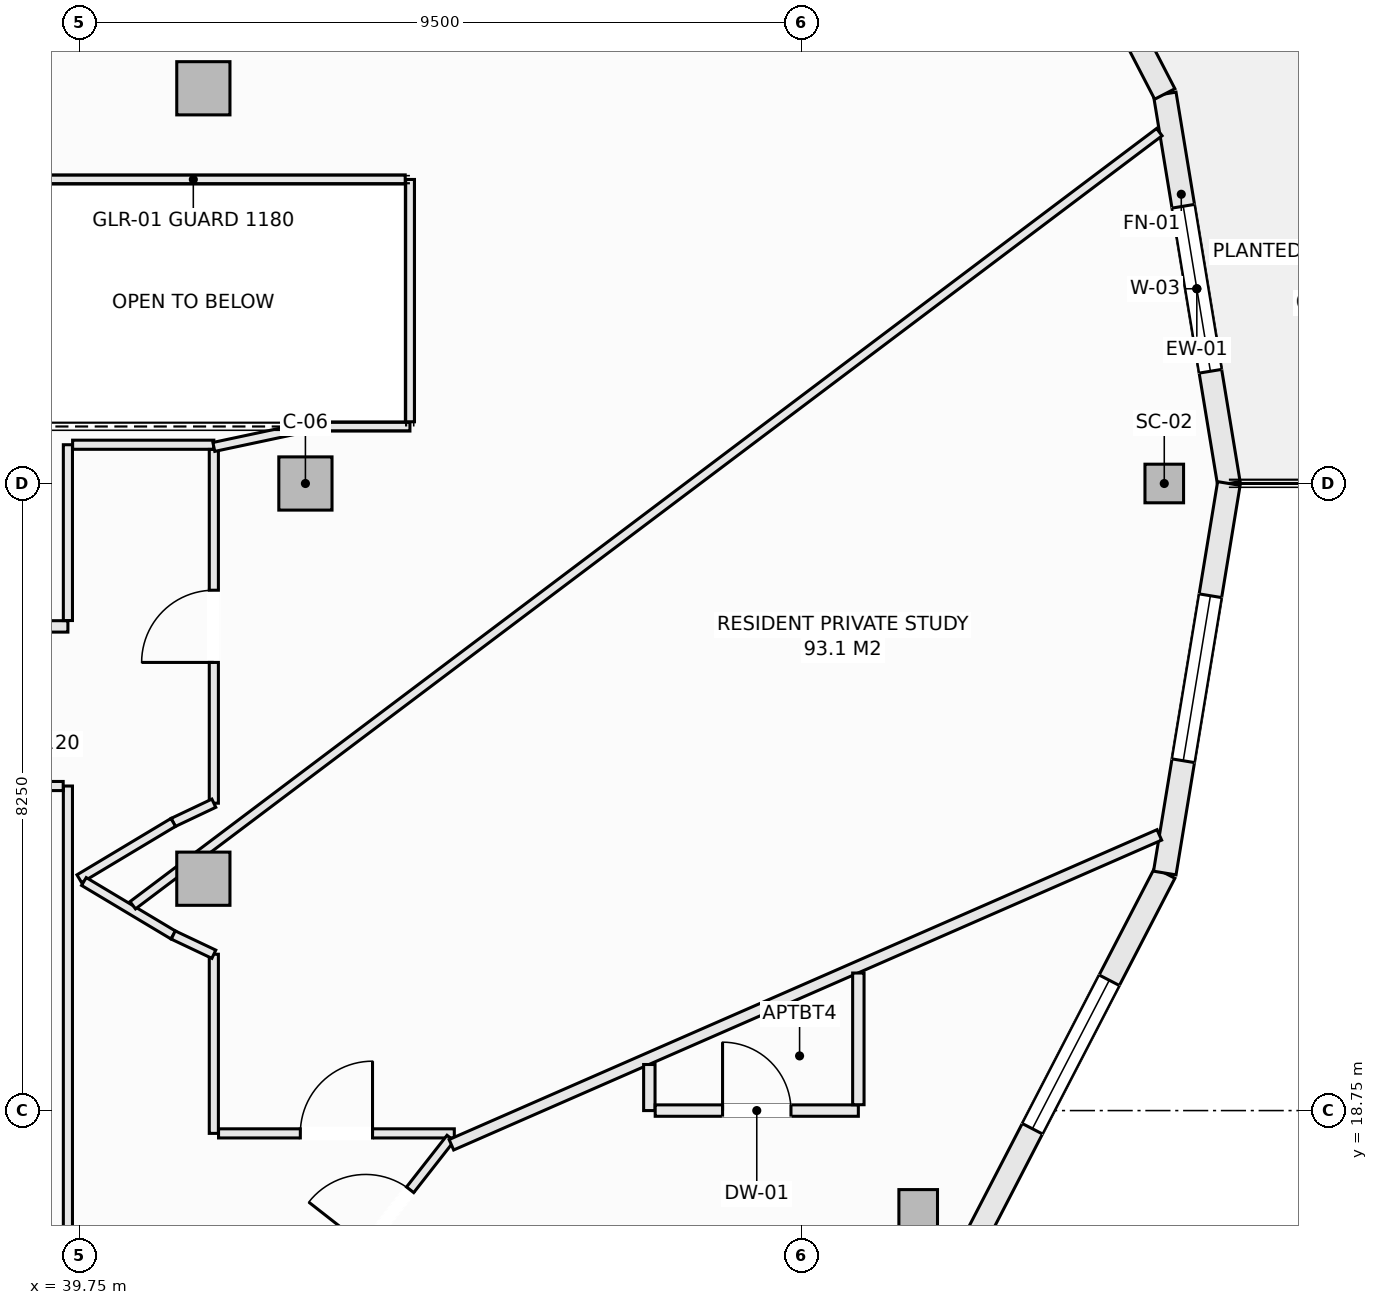
"""IFC4 building model, lengths in metres.
Left out: names, types, materials, properties, quantities, classifications, styles, units other than length and angle.
Written with IfcOpenShell. Run it as: python <this file> out.ifc"""

import sys

from ifc_helpers import new_model, si_unit, direction, frame, frame_2d, origin, origin_2d, place, context, subcontext, project, spatial, rectangle, hollow_rectangle, extrude, element, fill, save


model = new_model("IFC4")
c1 = context("Model", 3, precision=1e-05, world=origin(), true_north=direction((0.0, 1.0)))
c2 = subcontext(c1, "Body", "Model", "MODEL_VIEW")
j1 = project(units=[si_unit("LENGTHUNIT", "METRE"), si_unit("PLANEANGLEUNIT", "RADIAN")], contexts=[c1])
p1 = place(None, origin())
s1 = spatial("IfcSite", under=j1, at=p1, CompositionType="ELEMENT")
p2 = place(p1, origin())
s2 = spatial("IfcBuilding", under=s1, at=p2, CompositionType="ELEMENT")
p3 = place(p2, frame((0.0, 0.0, 196.4)))
s3 = spatial("IfcBuildingStorey", under=s2, at=p3, CompositionType="ELEMENT", Elevation=196.4)
for number, where, z_axis, x_axis in (
    (1, (54.025, 27.0, -0.27), (0.0, 0.0, 1.0), (1.0, 0.0, 0.0)),
    (2, (50.787, 17.456, -0.27), (0.0, 0.0, 1.0), (1.0, 0.0, 0.0)),
):
    element("IfcColumn", number, at=place(p3, frame(where, z_axis=z_axis, x_axis=x_axis)), inside=s3, PredefinedType="COLUMN", context=c2, shape_type="SweptSolid", body=[
        extrude(hollow_rectangle(XDim=0.508, YDim=0.508, WallThickness=0.019, at=origin_2d()), origin(), (0.0, 0.0, 1.0), 3.3),
    ])
for number, where, z_axis, x_axis in (
    (3, (42.725, 27.0, -0.27), (0.0, 0.0, 1.0), (1.0, 0.0, 0.0)),
    (4, (41.382, 32.199, -0.27), (0.0, 0.0, 1.0), (1.0, 0.0, 0.0)),
    (5, (41.382, 21.801, -0.27), (0.0, 0.0, 1.0), (1.0, 0.0, 0.0)),
):
    element("IfcColumn", number, at=place(p3, frame(where, z_axis=z_axis, x_axis=x_axis)), inside=s3, PredefinedType="COLUMN", context=c2, shape_type="SweptSolid", body=[
        extrude(rectangle(XDim=0.7, YDim=0.7, at=origin_2d()), origin(), (0.0, 0.0, 1.0), 3.3),
    ])
p4 = place(p3, frame((54.032, 32.125, 0.0), z_axis=(0.0, 0.0, 1.0), x_axis=(0.16237087798, -0.986729799886, 0.0)))
e6 = element("IfcWall", 6, at=p4, inside=s3, PredefinedType="SOLIDWALL", context=c2, shape_type="SweptSolid", body=[
    extrude(rectangle(XDim=5.193, YDim=0.3, at=frame_2d((2.597, 0.0))), origin(), (0.0, 0.0, 1.0), 2.605),
])
p5 = place(p4, frame((1.497, 0.0, 0.72)))
e7 = element("IfcOpeningElement", 7, at=p5, cuts=e6, PredefinedType="OPENING", context=c2, shape_type="SweptSolid", body=[
    extrude(rectangle(XDim=2.2, YDim=1.65, at=frame_2d((1.1, 0.825))), frame((0.0, 0.16, 0.0), z_axis=(0.0, -1.0, 0.0), x_axis=(1.0, 0.0, 0.0)), (0.0, 0.0, 1.0), 0.32),
])
p6 = place(p3, frame((51.559, 36.9, 0.0), z_axis=(0.0, 0.0, 1.0), x_axis=(0.459808219482, -0.888018243786, 0.0)))
e8 = element("IfcWall", 8, at=p6, inside=s3, PredefinedType="SOLIDWALL", context=c2, shape_type="SweptSolid", body=[
    extrude(rectangle(XDim=5.378, YDim=0.3, at=frame_2d((2.689, 0.0))), origin(), (0.0, 0.0, 1.0), 2.605),
])
p7 = place(p6, frame((1.789, 0.0, 0.0)))
e9 = element("IfcOpeningElement", 9, at=p7, cuts=e8, PredefinedType="OPENING", context=c2, shape_type="SweptSolid", body=[
    extrude(rectangle(XDim=1.8, YDim=2.25, at=frame_2d((0.9, 1.125))), frame((0.0, 0.16, 0.0), z_axis=(0.0, -1.0, 0.0), x_axis=(1.0, 0.0, 0.0)), (0.0, 0.0, 1.0), 0.32),
])
p8 = place(p3, frame((51.559, 17.1, 0.0), z_axis=(0.0, 0.0, 1.0), x_axis=(0.459808219482, 0.888018243786, 0.0)))
e10 = element("IfcWall", 10, at=p8, inside=s3, PredefinedType="SOLIDWALL", context=c2, shape_type="SweptSolid", body=[
    extrude(rectangle(XDim=5.378, YDim=0.3, at=frame_2d((2.689, 0.0))), origin(), (0.0, 0.0, 1.0), 2.605),
])
p9 = place(p8, frame((1.589, 0.0, 0.72)))
e11 = element("IfcOpeningElement", 11, at=p9, cuts=e10, PredefinedType="OPENING", context=c2, shape_type="SweptSolid", body=[
    extrude(rectangle(XDim=2.2, YDim=1.65, at=frame_2d((1.1, 0.825))), frame((0.0, 0.16, 0.0), z_axis=(0.0, -1.0, 0.0), x_axis=(1.0, 0.0, 0.0)), (0.0, 0.0, 1.0), 0.32),
])
p10 = place(p3, frame((54.032, 21.875, 0.0), z_axis=(0.0, 0.0, 1.0), x_axis=(0.16237087798, 0.986729799886, 0.0)))
e12 = element("IfcWall", 12, at=p10, inside=s3, PredefinedType="SOLIDWALL", context=c2, shape_type="SweptSolid", body=[
    extrude(rectangle(XDim=5.193, YDim=0.3, at=frame_2d((2.597, 0.0))), origin(), (0.0, 0.0, 1.0), 2.605),
])
p11 = place(p10, frame((1.497, 0.0, 0.72)))
e13 = element("IfcOpeningElement", 13, at=p11, cuts=e12, PredefinedType="OPENING", context=c2, shape_type="SweptSolid", body=[
    extrude(rectangle(XDim=2.2, YDim=1.65, at=frame_2d((1.1, 0.825))), frame((0.0, 0.16, 0.0), z_axis=(0.0, -1.0, 0.0), x_axis=(1.0, 0.0, 0.0)), (0.0, 0.0, 1.0), 0.32),
])
p12 = place(p3, frame((29.78, 25.12, 0.0), z_axis=(0.0, 0.0, 1.0), x_axis=(1.0, 0.0, 0.0)))
e14 = element("IfcWall", 14, at=p12, inside=s3, PredefinedType="PARTITIONING", context=c2, shape_type="SweptSolid", body=[
    extrude(rectangle(XDim=9.82, YDim=0.15, at=frame_2d((4.91, 0.0))), origin(), (0.0, 0.0, 1.0), 3.03),
])
p13 = place(p12, frame((3.14, 0.0, 0.0)))
e15 = element("IfcOpeningElement", 15, at=p13, cuts=e14, PredefinedType="OPENING", context=c2, shape_type="SweptSolid", body=[
    extrude(rectangle(XDim=0.95, YDim=2.1, at=frame_2d((0.475, 1.05))), frame((0.0, 0.085, 0.0), z_axis=(0.0, -1.0, 0.0), x_axis=(1.0, 0.0, 0.0)), (0.0, 0.0, 1.0), 0.17),
])
p14 = place(p12, frame((7.445, 0.0, 0.0)))
e16 = element("IfcOpeningElement", 16, at=p14, cuts=e14, PredefinedType="OPENING", context=c2, shape_type="SweptSolid", body=[
    extrude(rectangle(XDim=0.95, YDim=2.1, at=frame_2d((0.475, 1.05))), frame((0.0, 0.085, 0.0), z_axis=(0.0, -1.0, 0.0), x_axis=(1.0, 0.0, 0.0)), (0.0, 0.0, 1.0), 0.17),
])
p15 = place(p3, frame((39.6, 16.5, 0.0), z_axis=(0.0, 0.0, 1.0), x_axis=(0.0, 1.0, 0.0)))
e17 = element("IfcWall", 17, at=p15, inside=s3, PredefinedType="PARTITIONING", context=c2, shape_type="SweptSolid", body=[
    extrude(rectangle(XDim=6.52, YDim=0.12, at=frame_2d((3.26, 0.0))), origin(), (0.0, 0.0, 1.0), 2.478),
])
p16 = place(p3, frame((39.6, 25.197, 0.0), z_axis=(0.0, 0.0, 1.0), x_axis=(0.0, 1.0, 0.0)))
e18 = element("IfcWall", 18, at=p16, inside=s3, PredefinedType="PARTITIONING", context=c2, shape_type="SweptSolid", body=[
    extrude(rectangle(XDim=2.313, YDim=0.12, at=frame_2d((1.156, 0.0))), origin(), (0.0, 0.0, 1.0), 3.03),
])
p17 = place(p3, frame((39.662, 27.51, 0.0), z_axis=(0.0, 0.0, 1.0), x_axis=(1.0, 0.0, 0.0)))
e19 = element("IfcWall", 19, at=p17, inside=s3, PredefinedType="PARTITIONING", context=c2, shape_type="SweptSolid", body=[
    extrude(rectangle(XDim=1.858, YDim=0.12, at=frame_2d((0.929, 0.0))), origin(), (0.0, 0.0, 1.0), 3.03),
])
p18 = place(p3, frame((41.52, 18.45, 0.0), z_axis=(0.0, 0.0, 1.0), x_axis=(0.0, 1.0, 0.0)))
e20 = element("IfcWall", 20, at=p18, inside=s3, PredefinedType="PARTITIONING", context=c2, shape_type="SweptSolid", body=[
    extrude(rectangle(XDim=2.357, YDim=0.12, at=frame_2d((1.178, 0.0))), origin(), (0.0, 0.0, 1.0), 3.03),
])
p19 = place(p3, frame((41.52, 22.794, 0.0), z_axis=(0.0, 0.0, 1.0), x_axis=(0.0, 1.0, 0.0)))
e21 = element("IfcWall", 21, at=p19, inside=s3, PredefinedType="PARTITIONING", context=c2, shape_type="SweptSolid", body=[
    extrude(rectangle(XDim=4.654, YDim=0.12, at=frame_2d((2.327, 0.0))), origin(), (0.0, 0.0, 1.0), 2.478),
])
p20 = place(p19, frame((1.852, 0.0, 0.0)))
e22 = element("IfcOpeningElement", 22, at=p20, cuts=e21, PredefinedType="OPENING", context=c2, shape_type="SweptSolid", body=[
    extrude(rectangle(XDim=0.95, YDim=2.1, at=frame_2d((0.475, 1.05))), frame((0.0, 0.07, 0.0), z_axis=(0.0, -1.0, 0.0), x_axis=(1.0, 0.0, 0.0)), (0.0, 0.0, 1.0), 0.14),
])
p21 = place(p3, frame((40.986, 22.541, 0.0), z_axis=(0.0, 0.0, 1.0), x_axis=(0.903729424576, 0.428104107847, 0.0)))
e23 = element("IfcWall", 23, at=p21, inside=s3, PredefinedType="PARTITIONING", context=c2, shape_type="SweptSolid", body=[
    extrude(rectangle(XDim=0.591, YDim=0.12, at=frame_2d((0.295, 0.0))), origin(), (0.0, 0.0, 1.0), 3.03),
])
p22 = place(p3, frame((39.75, 21.8, 0.0), z_axis=(0.0, 0.0, 1.0), x_axis=(0.857702120906, 0.514146935996, 0.0)))
e24 = element("IfcWall", 24, at=p22, inside=s3, PredefinedType="PARTITIONING", context=c2, shape_type="SweptSolid", body=[
    extrude(rectangle(XDim=1.441, YDim=0.12, at=frame_2d((0.721, 0.0))), origin(), (0.0, 0.0, 1.0), 3.03),
])
p23 = place(p3, frame((39.81, 21.764, 0.0), z_axis=(0.0, 0.0, 1.0), x_axis=(0.858011245414, -0.513630901273, 0.0)))
e25 = element("IfcWall", 25, at=p23, inside=s3, PredefinedType="PARTITIONING", context=c2, shape_type="SweptSolid", body=[
    extrude(rectangle(XDim=1.37, YDim=0.12, at=frame_2d((0.685, 0.0))), origin(), (0.0, 0.0, 1.0), 3.03),
])
p24 = place(p3, frame((40.986, 21.06, 0.0), z_axis=(0.0, 0.0, 1.0), x_axis=(0.90356951601, -0.428441512621, 0.0)))
e26 = element("IfcWall", 26, at=p24, inside=s3, PredefinedType="PARTITIONING", context=c2, shape_type="SweptSolid", body=[
    extrude(rectangle(XDim=0.591, YDim=0.12, at=frame_2d((0.295, 0.0))), origin(), (0.0, 0.0, 1.0), 3.03),
])
p25 = place(p3, frame((41.582, 18.45, 0.0), z_axis=(0.0, 0.0, 1.0), x_axis=(1.0, 0.0, 0.0)))
e27 = element("IfcWall", 27, at=p25, inside=s3, PredefinedType="PARTITIONING", context=c2, shape_type="SweptSolid", body=[
    extrude(rectangle(XDim=3.102, YDim=0.12, at=frame_2d((1.551, 0.0))), origin(), (0.0, 0.0, 1.0), 3.03),
])
p26 = place(p25, frame((1.076, 0.0, 0.0)))
e28 = element("IfcOpeningElement", 28, at=p26, cuts=e27, PredefinedType="OPENING", context=c2, shape_type="SweptSolid", body=[
    extrude(rectangle(XDim=0.95, YDim=2.1, at=frame_2d((0.475, 1.05))), frame((0.0, 0.07, 0.0), z_axis=(0.0, -1.0, 0.0), x_axis=(1.0, 0.0, 0.0)), (0.0, 0.0, 1.0), 0.14),
])
p27 = place(p3, frame((43.157, 16.5, 0.0), z_axis=(0.0, 0.0, 1.0), x_axis=(0.616566276607, 0.787303008092, 0.0)))
e29 = element("IfcWall", 29, at=p27, inside=s3, PredefinedType="PARTITIONING", context=c2, shape_type="SweptSolid", body=[
    extrude(rectangle(XDim=2.398, YDim=0.12, at=frame_2d((1.199, 0.0))), origin(), (0.0, 0.0, 1.0), 3.03),
])
p28 = place(p27, frame((0.584, 0.0, 0.0)))
e30 = element("IfcOpeningElement", 30, at=p28, cuts=e29, PredefinedType="OPENING", context=c2, shape_type="SweptSolid", body=[
    extrude(rectangle(XDim=0.95, YDim=2.1, at=frame_2d((0.475, 1.05))), frame((0.0, 0.07, 0.0), z_axis=(0.0, -1.0, 0.0), x_axis=(1.0, 0.0, 0.0)), (0.0, 0.0, 1.0), 0.14),
])
p29 = place(p3, frame((39.0, 23.02, 0.0), z_axis=(0.0, 0.0, 1.0), x_axis=(1.0, 0.0, 0.0)))
e31 = element("IfcWall", 31, at=p29, inside=s3, PredefinedType="PARTITIONING", context=c2, shape_type="SweptSolid", body=[
    extrude(rectangle(XDim=0.538, YDim=0.12, at=frame_2d((0.269, 0.0))), origin(), (0.0, 0.0, 1.0), 3.03),
])
p30 = place(p3, frame((40.453, 21.451, 0.0), z_axis=(0.0, 0.0, 1.0), x_axis=(0.798820239576, 0.601569800475, 0.0)))
e32 = element("IfcWall", 32, at=p30, inside=s3, PredefinedType="PARTITIONING", context=c2, shape_type="SweptSolid", body=[
    extrude(rectangle(XDim=16.908, YDim=0.12, at=frame_2d((8.454, 0.0))), origin(), (0.0, 0.0, 1.0), 2.478),
])
p31 = place(p3, frame((44.646, 18.3, 0.0), z_axis=(0.0, 0.0, 1.0), x_axis=(0.916103872047, 0.400941012645, 0.0)))
e33 = element("IfcWall", 33, at=p31, inside=s3, PredefinedType="PARTITIONING", context=c2, shape_type="SweptSolid", body=[
    extrude(rectangle(XDim=10.168, YDim=0.15, at=frame_2d((5.084, 0.0))), origin(), (0.0, 0.0, 1.0), 3.03),
])
p32 = place(p3, frame((47.25, 18.75, 0.0), z_axis=(0.0, 0.0, 1.0), x_axis=(0.0, 1.0, 0.0)))
e34 = element("IfcWall", 34, at=p32, inside=s3, PredefinedType="PARTITIONING", context=c2, shape_type="SweptSolid", body=[
    extrude(rectangle(XDim=0.606, YDim=0.15, at=frame_2d((0.303, 0.0))), origin(), (0.0, 0.0, 1.0), 3.03),
])
p33 = place(p3, frame((47.327, 18.75, 0.0), z_axis=(0.0, 0.0, 1.0), x_axis=(1.0, 0.0, 0.0)))
e35 = element("IfcWall", 35, at=p33, inside=s3, PredefinedType="PARTITIONING", context=c2, shape_type="SweptSolid", body=[
    extrude(rectangle(XDim=2.673, YDim=0.15, at=frame_2d((1.336, 0.0))), origin(), (0.0, 0.0, 1.0), 2.712),
])
p34 = place(p33, frame((0.886, 0.0, 0.0)))
e36 = element("IfcOpeningElement", 36, at=p34, cuts=e35, PredefinedType="OPENING", context=c2, shape_type="SweptSolid", body=[
    extrude(rectangle(XDim=0.9, YDim=2.1, at=frame_2d((0.45, 1.05))), frame((0.0, 0.085, 0.0), z_axis=(0.0, -1.0, 0.0), x_axis=(1.0, 0.0, 0.0)), (0.0, 0.0, 1.0), 0.17),
])
p35 = place(p3, frame((50.0, 18.827, 0.0), z_axis=(0.0, 0.0, 1.0), x_axis=(0.0, 1.0, 0.0)))
e37 = element("IfcWall", 37, at=p35, inside=s3, PredefinedType="PARTITIONING", context=c2, shape_type="SweptSolid", body=[
    extrude(rectangle(XDim=1.733, YDim=0.15, at=frame_2d((0.866, 0.0))), origin(), (0.0, 0.0, 1.0), 3.03),
])
p36 = place(p3, frame((41.52, 27.481, 0.0), z_axis=(0.0, 0.0, 1.0), x_axis=(0.978151658552, 0.207892599368, 0.0)))
e38 = element("IfcWall", 38, at=p36, inside=s3, PredefinedType="PARTITIONING", context=c2, shape_type="SweptSolid", body=[
    extrude(rectangle(XDim=1.294, YDim=0.12, at=frame_2d((0.647, 0.0))), origin(), (0.0, 0.0, 1.0), 3.03),
])
p37 = place(p3, frame((42.786, 27.75, 0.0), z_axis=(0.0, 0.0, 1.0), x_axis=(1.0, 0.0, 0.0)))
e39 = element("IfcWall", 39, at=p37, inside=s3, PredefinedType="PARTITIONING", context=c2, shape_type="SweptSolid", body=[
    extrude(rectangle(XDim=1.314, YDim=0.12, at=frame_2d((0.657, 0.0))), origin(), (0.0, 0.0, 1.0), 3.03),
])
p38 = place(p3, frame((44.1, 27.812, 0.0), z_axis=(0.0, 0.0, 1.0), x_axis=(0.0, 1.0, 0.0)))
e40 = element("IfcWall", 40, at=p38, inside=s3, PredefinedType="PARTITIONING", context=c2, shape_type="SweptSolid", body=[
    extrude(rectangle(XDim=3.188, YDim=0.12, at=frame_2d((1.594, 0.0))), origin(), (0.0, 0.0, 1.0), 3.03),
])
p39 = place(p3, frame((38.738, 31.0, 0.0), z_axis=(0.0, 0.0, 1.0), x_axis=(1.0, 0.0, 0.0)))
e41 = element("IfcWall", 41, at=p39, inside=s3, PredefinedType="PARTITIONING", context=c2, shape_type="SweptSolid", body=[
    extrude(rectangle(XDim=5.3, YDim=0.12, at=frame_2d((2.65, 0.0))), origin(), (0.0, 0.0, 1.0), 3.03),
])
p40 = place(p5, origin())
e42 = element("IfcWindow", 42, at=p40, inside=s3, PartitioningType="SINGLE_PANEL", PredefinedType="WINDOW", context=c2, shape_type="SweptSolid", body=[
    extrude(rectangle(XDim=2.2, YDim=1.65, at=frame_2d((1.1, 0.825))), frame((0.0, 0.03, 0.0), z_axis=(0.0, -1.0, 0.0), x_axis=(1.0, 0.0, 0.0)), (0.0, 0.0, 1.0), 0.06),
])
fill(e7, e42)
p41 = place(p9, origin())
e43 = element("IfcWindow", 43, at=p41, inside=s3, PartitioningType="SINGLE_PANEL", PredefinedType="WINDOW", context=c2, shape_type="SweptSolid", body=[
    extrude(rectangle(XDim=2.2, YDim=1.65, at=frame_2d((1.1, 0.825))), frame((0.0, 0.03, 0.0), z_axis=(0.0, -1.0, 0.0), x_axis=(1.0, 0.0, 0.0)), (0.0, 0.0, 1.0), 0.06),
])
fill(e11, e43)
p42 = place(p11, origin())
e44 = element("IfcWindow", 44, at=p42, inside=s3, PartitioningType="SINGLE_PANEL", PredefinedType="WINDOW", context=c2, shape_type="SweptSolid", body=[
    extrude(rectangle(XDim=2.2, YDim=1.65, at=frame_2d((1.1, 0.825))), frame((0.0, 0.03, 0.0), z_axis=(0.0, -1.0, 0.0), x_axis=(1.0, 0.0, 0.0)), (0.0, 0.0, 1.0), 0.06),
])
fill(e13, e44)
p43 = place(p28, origin())
e45 = element("IfcDoor", 45, at=p43, inside=s3, OperationType="SINGLE_SWING_LEFT", PredefinedType="DOOR", context=c2, shape_type="SweptSolid", body=[
    extrude(rectangle(XDim=0.95, YDim=2.1, at=frame_2d((0.475, 1.05))), frame((0.0, 0.025, 0.0), z_axis=(0.0, -1.0, 0.0), x_axis=(1.0, 0.0, 0.0)), (0.0, 0.0, 1.0), 0.05),
])
fill(e30, e45)
p44 = place(p26, origin())
e46 = element("IfcDoor", 46, at=p44, inside=s3, OperationType="SINGLE_SWING_RIGHT", PredefinedType="DOOR", context=c2, shape_type="SweptSolid", body=[
    extrude(rectangle(XDim=0.95, YDim=2.1, at=frame_2d((0.475, 1.05))), frame((0.0, 0.025, 0.0), z_axis=(0.0, -1.0, 0.0), x_axis=(1.0, 0.0, 0.0)), (0.0, 0.0, 1.0), 0.05),
])
fill(e28, e46)
p45 = place(p20, origin())
e47 = element("IfcDoor", 47, at=p45, inside=s3, OperationType="SINGLE_SWING_LEFT", PredefinedType="DOOR", context=c2, shape_type="SweptSolid", body=[
    extrude(rectangle(XDim=0.95, YDim=2.1, at=frame_2d((0.475, 1.05))), frame((0.0, 0.025, 0.0), z_axis=(0.0, -1.0, 0.0), x_axis=(1.0, 0.0, 0.0)), (0.0, 0.0, 1.0), 0.05),
])
fill(e22, e47)
p46 = place(p34, origin())
e48 = element("IfcDoor", 48, at=p46, inside=s3, OperationType="SINGLE_SWING_LEFT", PredefinedType="DOOR", context=c2, shape_type="SweptSolid", body=[
    extrude(rectangle(XDim=0.9, YDim=2.1, at=frame_2d((0.45, 1.05))), frame((0.0, 0.025, 0.0), z_axis=(0.0, -1.0, 0.0), x_axis=(1.0, 0.0, 0.0)), (0.0, 0.0, 1.0), 0.05),
])
fill(e36, e48)
save(model, sys.argv[1])
